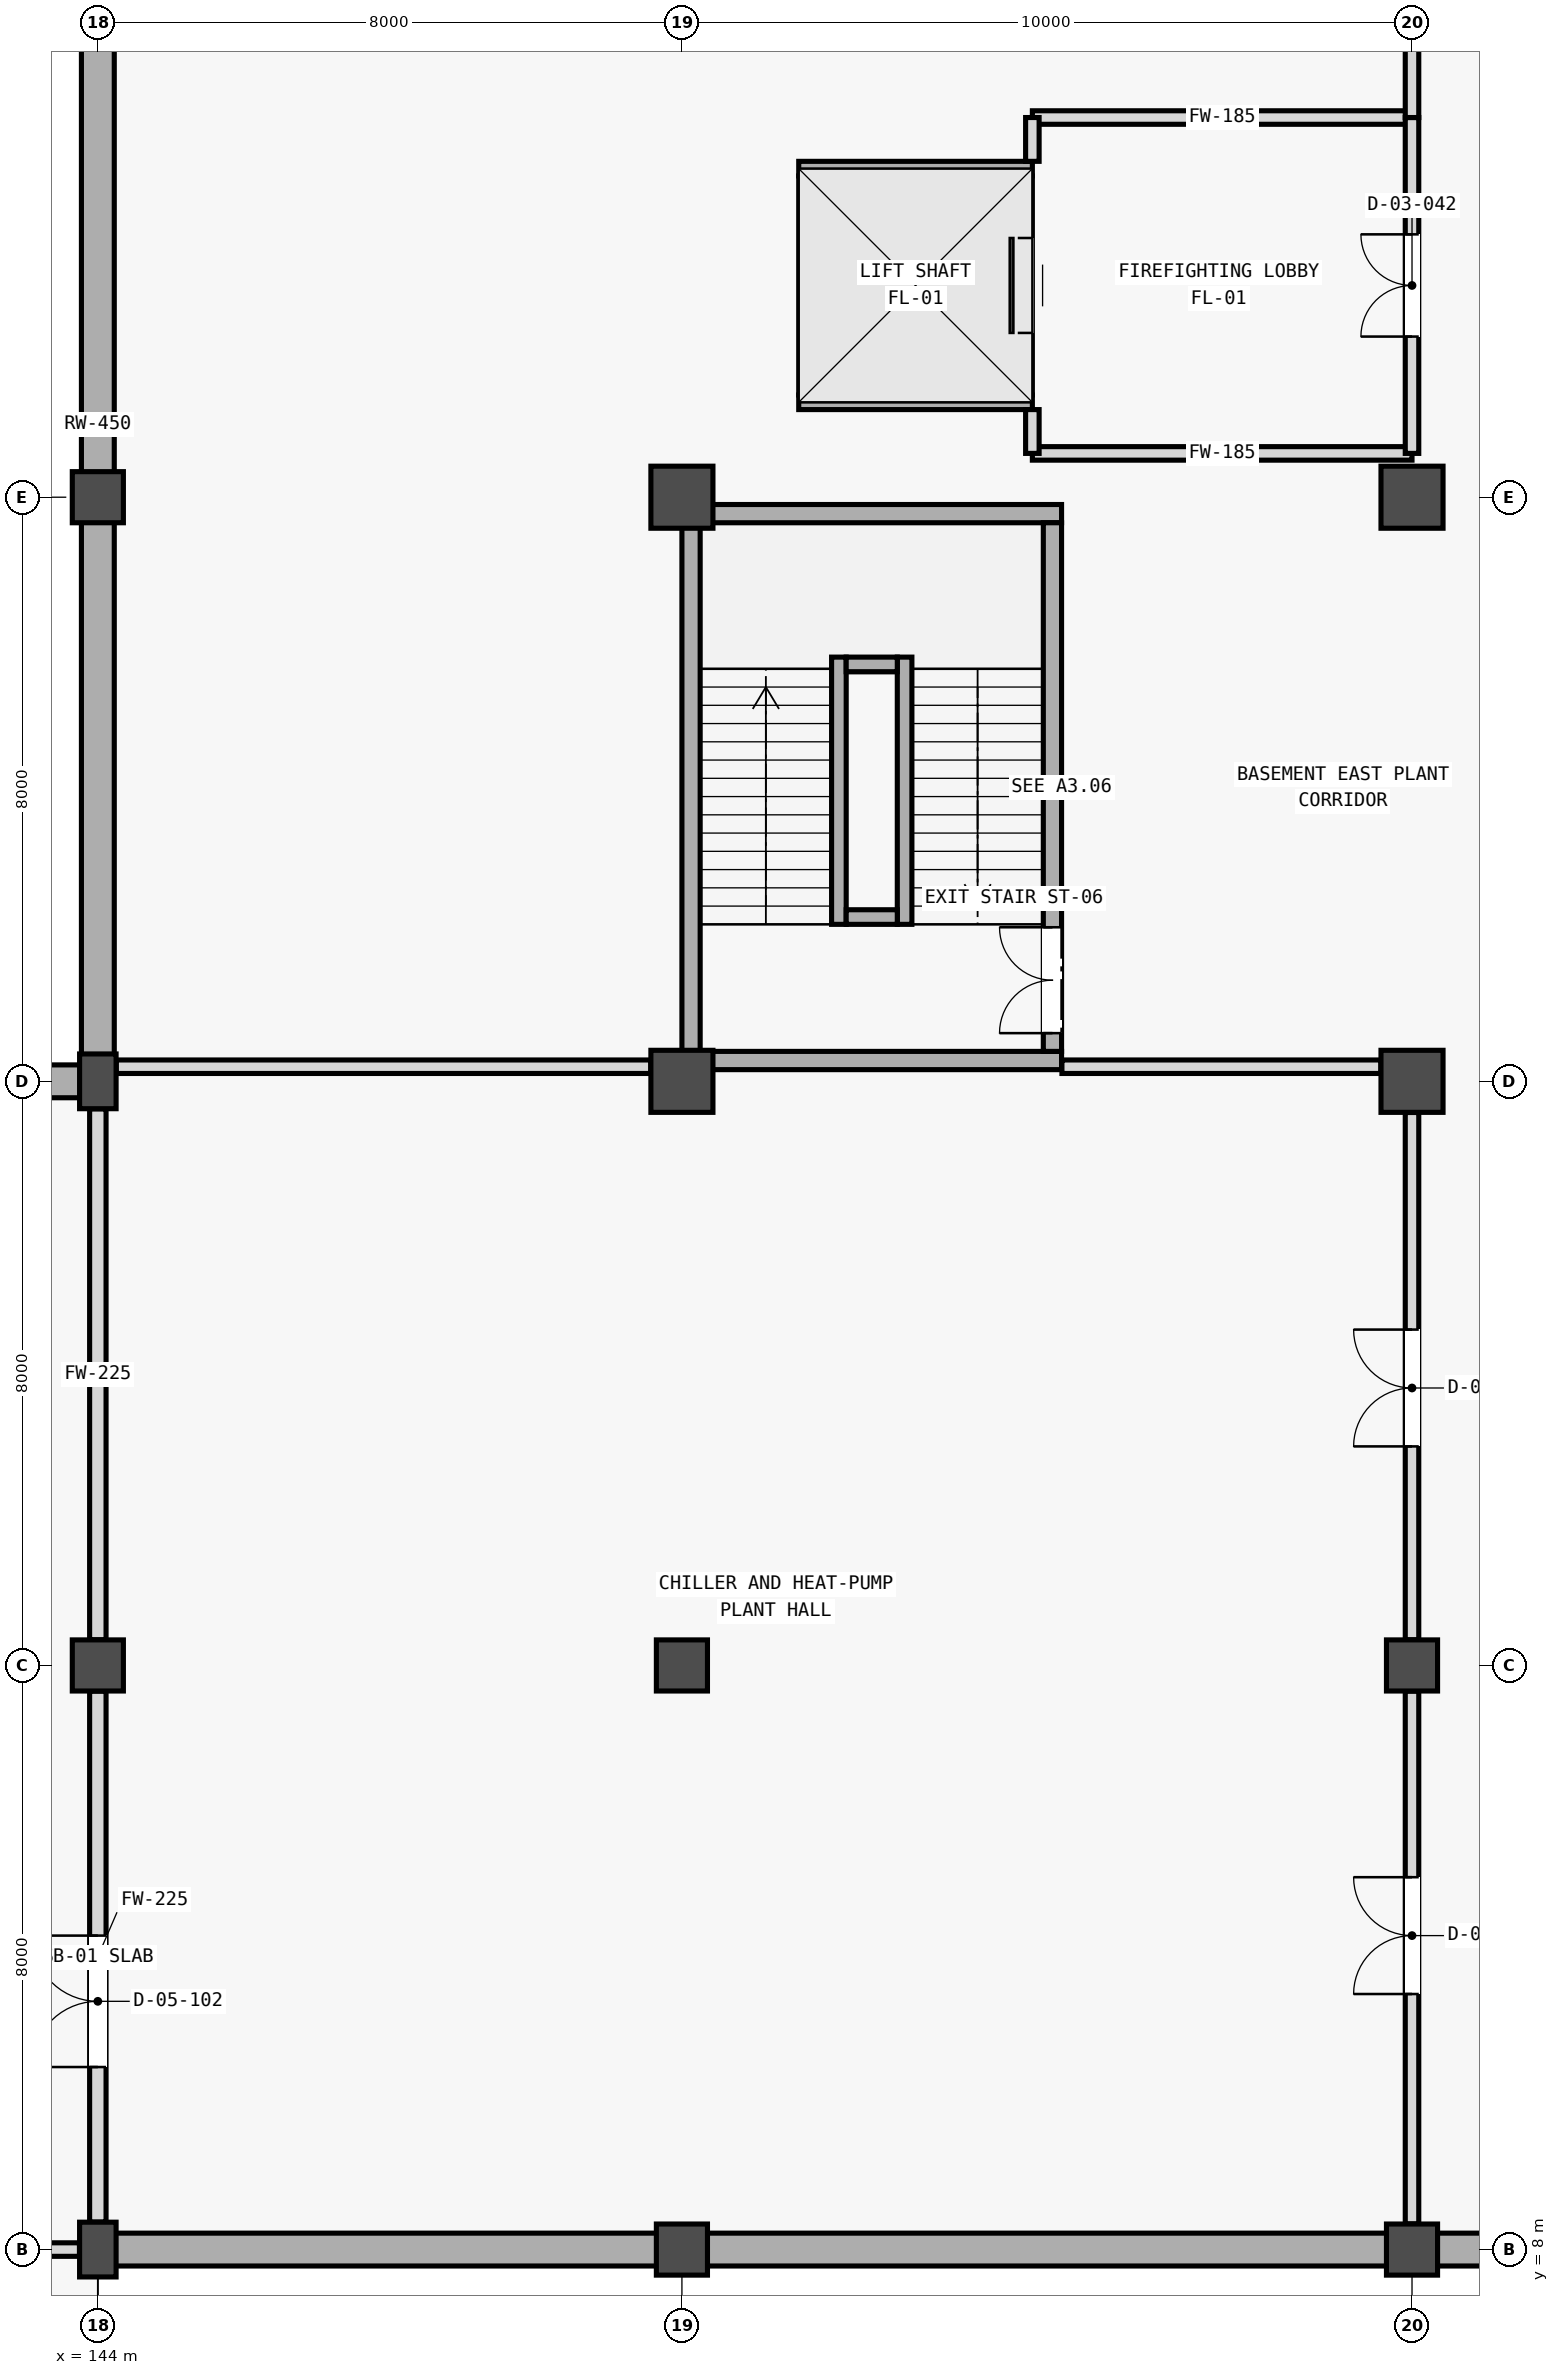
"""IFC4 building model, lengths in metres.
Left out: names, types, materials, properties, quantities, classifications, styles, units other than length and angle.
Written with IfcOpenShell. Run it as: python <this file> out.ifc"""

import sys

from ifc_helpers import new_model, si_unit, direction, frame, frame_2d, origin, origin_2d, place, context, subcontext, project, spatial, rectangle, extrude, element, fill, save


model = new_model("IFC4")
c1 = context("Model", 3, precision=1e-05, world=origin(), true_north=direction((0.0, 1.0)))
c2 = subcontext(c1, "Body", "Model", "MODEL_VIEW")
j1 = project(units=[si_unit("LENGTHUNIT", "METRE"), si_unit("PLANEANGLEUNIT", "RADIAN")], contexts=[c1])
p1 = place(None, origin())
s1 = spatial("IfcSite", under=j1, at=p1, CompositionType="ELEMENT")
p2 = place(p1, origin())
s2 = spatial("IfcBuilding", under=s1, at=p2, CompositionType="ELEMENT")
p3 = place(p2, frame((0.0, 0.0, -4.8)))
s3 = spatial("IfcBuildingStorey", under=s2, at=p3, CompositionType="ELEMENT", Elevation=-4.8)
for number, where, z_axis, x_axis in (
    (1, (144.0, 8.0, 0.0), (0.0, 0.0, 1.0), (1.0, 0.0, 0.0)),
    (2, (144.0, 24.0, 0.0), (0.0, 0.0, 1.0), (1.0, 0.0, 0.0)),
):
    element("IfcColumn", number, at=place(p3, frame(where, z_axis=z_axis, x_axis=x_axis)), inside=s3, PredefinedType="COLUMN", context=c2, shape_type="SweptSolid", body=[
        extrude(rectangle(XDim=0.5, YDim=0.75, at=origin_2d()), origin(), (0.0, 0.0, 1.0), 4.5),
    ])
for number, where, z_axis, x_axis in (
    (3, (144.0, 16.0, 0.0), (0.0, 0.0, 1.0), (1.0, 0.0, 0.0)),
    (4, (152.0, 8.0, 0.0), (0.0, 0.0, 1.0), (1.0, 0.0, 0.0)),
    (5, (162.0, 8.0, 0.0), (0.0, 0.0, 1.0), (1.0, 0.0, 0.0)),
    (6, (152.0, 16.0, 0.0), (0.0, 0.0, 1.0), (1.0, 0.0, 0.0)),
    (7, (162.0, 16.0, 0.0), (0.0, 0.0, 1.0), (1.0, 0.0, 0.0)),
):
    element("IfcColumn", number, at=place(p3, frame(where, z_axis=z_axis, x_axis=x_axis)), inside=s3, PredefinedType="COLUMN", context=c2, shape_type="SweptSolid", body=[
        extrude(rectangle(XDim=0.7, YDim=0.7, at=origin_2d()), origin(), (0.0, 0.0, 1.0), 4.5),
    ])
for number, where, z_axis, x_axis in (
    (8, (152.0, 24.0, 0.0), (0.0, 0.0, 1.0), (1.0, 0.0, 0.0)),
    (9, (162.0, 24.0, 0.0), (0.0, 0.0, 1.0), (1.0, 0.0, 0.0)),
):
    element("IfcColumn", number, at=place(p3, frame(where, z_axis=z_axis, x_axis=x_axis)), inside=s3, PredefinedType="COLUMN", context=c2, shape_type="SweptSolid", body=[
        extrude(rectangle(XDim=0.85, YDim=0.85, at=origin_2d()), origin(), (0.0, 0.0, 1.0), 4.5),
    ])
p4 = place(p3, frame((144.0, 32.0, 0.0), z_axis=(0.0, 0.0, 1.0), x_axis=(1.0, 0.0, 0.0)))
e10 = element("IfcColumn", 10, at=p4, inside=s3, PredefinedType="COLUMN", context=c2, shape_type="SweptSolid", body=[
    extrude(rectangle(XDim=0.7, YDim=0.7, at=origin_2d()), origin(), (0.0, 0.0, 1.0), 4.5),
])
for number, where, z_axis, x_axis in (
    (11, (152.0, 32.0, 0.0), (0.0, 0.0, 1.0), (1.0, 0.0, 0.0)),
    (12, (162.0, 32.0, 0.0), (0.0, 0.0, 1.0), (1.0, 0.0, 0.0)),
):
    element("IfcColumn", number, at=place(p3, frame(where, z_axis=z_axis, x_axis=x_axis)), inside=s3, PredefinedType="COLUMN", context=c2, shape_type="SweptSolid", body=[
        extrude(rectangle(XDim=0.85, YDim=0.85, at=origin_2d()), origin(), (0.0, 0.0, 1.0), 4.5),
    ])
p5 = place(p3, frame((96.0, 24.0, 0.0), z_axis=(0.0, 0.0, 1.0), x_axis=(1.0, 0.0, 0.0)))
e13 = element("IfcWall", 13, at=p5, inside=s3, PredefinedType="SOLIDWALL", context=c2, shape_type="SweptSolid", body=[
    extrude(rectangle(XDim=48.0, YDim=0.45, at=frame_2d((24.0, 0.0))), origin(), (0.0, 0.0, 1.0), 4.47),
])
p6 = place(p3, frame((144.0, 24.0, 0.0), z_axis=(0.0, 0.0, 1.0), x_axis=(0.0, 1.0, 0.0)))
e14 = element("IfcWall", 14, at=p6, inside=s3, PredefinedType="SOLIDWALL", context=c2, shape_type="SweptSolid", body=[
    extrude(rectangle(XDim=60.0, YDim=0.45, at=frame_2d((30.0, 0.0))), origin(), (0.0, 0.0, 1.0), 4.47),
])
p7 = place(p3, frame((144.0, 8.0, 0.0), z_axis=(0.0, 0.0, 1.0), x_axis=(1.0, 0.0, 0.0)))
e15 = element("IfcWall", 15, at=p7, inside=s3, PredefinedType="SOLIDWALL", context=c2, shape_type="SweptSolid", body=[
    extrude(rectangle(XDim=24.0, YDim=0.45, at=frame_2d((12.0, 0.0))), origin(), (0.0, 0.0, 1.0), 4.47),
])
for number, where, z_axis, x_axis in (
    (16, (152.0, 24.285, 0.0), (0.0, 0.0, 1.0), (1.0, 0.0, 0.0)),
    (17, (152.0, 31.775, 0.0), (0.0, 0.0, 1.0), (1.0, 0.0, 0.0)),
):
    element("IfcWall", number, at=place(p3, frame(where, z_axis=z_axis, x_axis=x_axis)), inside=s3, PredefinedType="SHEAR", context=c2, shape_type="SweptSolid", body=[
        extrude(rectangle(XDim=5.2, YDim=0.25, at=frame_2d((2.6, 0.0))), origin(), (0.0, 0.0, 1.0), 4.8),
    ])
p8 = place(p3, frame((152.125, 24.41, 0.0), z_axis=(0.0, 0.0, 1.0), x_axis=(0.0, 1.0, 0.0)))
e18 = element("IfcWall", 18, at=p8, inside=s3, PredefinedType="SHEAR", context=c2, shape_type="SweptSolid", body=[
    extrude(rectangle(XDim=7.24, YDim=0.25, at=frame_2d((3.62, 0.0))), origin(), (0.0, 0.0, 1.0), 4.8),
])
p9 = place(p3, frame((157.075, 24.41, 0.0), z_axis=(0.0, 0.0, 1.0), x_axis=(0.0, 1.0, 0.0)))
e19 = element("IfcWall", 19, at=p9, inside=s3, PredefinedType="SHEAR", context=c2, shape_type="SweptSolid", body=[
    extrude(rectangle(XDim=7.24, YDim=0.25, at=frame_2d((3.62, 0.0))), origin(), (0.0, 0.0, 1.0), 4.8),
])
p10 = place(p9, frame((0.25, 0.0, 0.0)))
e20 = element("IfcOpeningElement", 20, at=p10, cuts=e19, PredefinedType="OPENING", context=c2, shape_type="SweptSolid", body=[
    extrude(rectangle(XDim=1.45, YDim=2.2, at=frame_2d((0.725, 1.1))), frame((0.0, 0.135, 0.0), z_axis=(0.0, -1.0, 0.0), x_axis=(1.0, 0.0, 0.0)), (0.0, 0.0, 1.0), 0.27),
])
for number, where, z_axis, x_axis in (
    (21, (154.15, 26.15, 0.0), (0.0, 0.0, 1.0), (0.0, 1.0, 0.0)),
    (22, (155.05, 26.15, 0.0), (0.0, 0.0, 1.0), (0.0, 1.0, 0.0)),
):
    element("IfcWall", number, at=place(p3, frame(where, z_axis=z_axis, x_axis=x_axis)), inside=s3, PredefinedType="SHEAR", context=c2, shape_type="SweptSolid", body=[
        extrude(rectangle(XDim=3.66, YDim=0.2, at=frame_2d((1.83, 0.0))), origin(), (0.0, 0.0, 1.0), 4.8),
    ])
for number, where, z_axis, x_axis in (
    (23, (154.25, 26.25, 0.0), (0.0, 0.0, 1.0), (1.0, 0.0, 0.0)),
    (24, (154.25, 29.71, 0.0), (0.0, 0.0, 1.0), (1.0, 0.0, 0.0)),
):
    element("IfcWall", number, at=place(p3, frame(where, z_axis=z_axis, x_axis=x_axis)), inside=s3, PredefinedType="SHEAR", context=c2, shape_type="SweptSolid", body=[
        extrude(rectangle(XDim=0.7, YDim=0.2, at=frame_2d((0.35, 0.0))), origin(), (0.0, 0.0, 1.0), 4.8),
    ])
for number, where, z_axis, x_axis in (
    (25, (153.6, 33.3, 0.0), (0.0, 0.0, 1.0), (1.0, 0.0, 0.0)),
    (26, (153.6, 36.5, 0.0), (0.0, 0.0, 1.0), (1.0, 0.0, 0.0)),
):
    element("IfcWall", number, at=place(p3, frame(where, z_axis=z_axis, x_axis=x_axis)), inside=s3, PredefinedType="SHEAR", context=c2, shape_type="SweptSolid", body=[
        extrude(rectangle(XDim=3.2, YDim=0.2, at=frame_2d((1.6, 0.0))), origin(), (0.0, 0.0, 1.0), 4.8),
    ])
p11 = place(p3, frame((153.7, 33.4, 0.0), z_axis=(0.0, 0.0, 1.0), x_axis=(0.0, 1.0, 0.0)))
e27 = element("IfcWall", 27, at=p11, inside=s3, PredefinedType="SHEAR", context=c2, shape_type="SweptSolid", body=[
    extrude(rectangle(XDim=3.0, YDim=0.2, at=frame_2d((1.5, 0.0))), origin(), (0.0, 0.0, 1.0), 4.8),
])
p12 = place(p3, frame((156.7, 33.4, 0.0), z_axis=(0.0, 0.0, 1.0), x_axis=(0.0, 1.0, 0.0)))
e28 = element("IfcWall", 28, at=p12, inside=s3, PredefinedType="SHEAR", context=c2, shape_type="SweptSolid", body=[
    extrude(rectangle(XDim=3.0, YDim=0.2, at=frame_2d((1.5, 0.0))), origin(), (0.0, 0.0, 1.0), 4.8),
])
p13 = place(p12, frame((0.85, 0.0, 0.0)))
e29 = element("IfcOpeningElement", 29, at=p13, cuts=e28, PredefinedType="OPENING", context=c2, shape_type="SweptSolid", body=[
    extrude(rectangle(XDim=1.3, YDim=2.3, at=frame_2d((0.65, 1.15))), frame((0.0, 0.11, 0.0), z_axis=(0.0, -1.0, 0.0), x_axis=(1.0, 0.0, 0.0)), (0.0, 0.0, 1.0), 0.22),
])
for number, where, z_axis, x_axis in (
    (30, (162.0, 32.6, 0.0), (0.0, 0.0, 1.0), (-1.0, 0.0, 0.0)),
    (31, (156.8, 37.2, 0.0), (0.0, 0.0, 1.0), (1.0, 0.0, 0.0)),
):
    element("IfcWall", number, at=place(p3, frame(where, z_axis=z_axis, x_axis=x_axis)), inside=s3, PredefinedType="STANDARD", context=c2, shape_type="SweptSolid", body=[
        extrude(rectangle(XDim=5.2, YDim=0.185, at=frame_2d((2.6, 0.0))), origin(), (0.0, 0.0, 1.0), 3.75),
    ])
p14 = place(p3, frame((162.0, 32.6, 0.0), z_axis=(0.0, 0.0, 1.0), x_axis=(0.0, 1.0, 0.0)))
e32 = element("IfcWall", 32, at=p14, inside=s3, PredefinedType="STANDARD", context=c2, shape_type="SweptSolid", body=[
    extrude(rectangle(XDim=4.6, YDim=0.185, at=frame_2d((2.3, 0.0))), origin(), (0.0, 0.0, 1.0), 3.75),
])
p15 = place(p14, frame((1.6, 0.0, 0.0)))
e33 = element("IfcOpeningElement", 33, at=p15, cuts=e32, PredefinedType="OPENING", context=c2, shape_type="SweptSolid", body=[
    extrude(rectangle(XDim=1.4, YDim=2.2, at=frame_2d((0.7, 1.1))), frame((0.0, 0.103, 0.0), z_axis=(0.0, -1.0, 0.0), x_axis=(1.0, 0.0, 0.0)), (0.0, 0.0, 1.0), 0.205),
])
for number, where, z_axis, x_axis in (
    (34, (156.8, 32.6, 0.0), (0.0, 0.0, 1.0), (0.0, 1.0, 0.0)),
    (35, (156.8, 36.6, 0.0), (0.0, 0.0, 1.0), (0.0, 1.0, 0.0)),
):
    element("IfcWall", number, at=place(p3, frame(where, z_axis=z_axis, x_axis=x_axis)), inside=s3, PredefinedType="STANDARD", context=c2, shape_type="SweptSolid", body=[
        extrude(rectangle(XDim=0.6, YDim=0.185, at=frame_2d((0.3, 0.0))), origin(), (0.0, 0.0, 1.0), 3.75),
    ])
p16 = place(p3, frame((144.0, 8.377, 0.0), z_axis=(0.0, 0.0, 1.0), x_axis=(0.0, 1.0, 0.0)))
e36 = element("IfcWall", 36, at=p16, inside=s3, PredefinedType="STANDARD", context=c2, shape_type="SweptSolid", body=[
    extrude(rectangle(XDim=7.271, YDim=0.225, at=frame_2d((3.635, 0.0))), origin(), (0.0, 0.0, 1.0), 3.9),
])
p17 = place(p16, frame((2.123, 0.0, 0.0)))
e37 = element("IfcOpeningElement", 37, at=p17, cuts=e36, PredefinedType="OPENING", context=c2, shape_type="SweptSolid", body=[
    extrude(rectangle(XDim=1.8, YDim=2.3, at=frame_2d((0.9, 1.15))), frame((0.0, 0.123, 0.0), z_axis=(0.0, -1.0, 0.0), x_axis=(1.0, 0.0, 0.0)), (0.0, 0.0, 1.0), 0.245),
])
p18 = place(p3, frame((144.0, 16.352, 0.0), z_axis=(0.0, 0.0, 1.0), x_axis=(0.0, 1.0, 0.0)))
e38 = element("IfcWall", 38, at=p18, inside=s3, PredefinedType="STANDARD", context=c2, shape_type="SweptSolid", body=[
    extrude(rectangle(XDim=7.271, YDim=0.225, at=frame_2d((3.635, 0.0))), origin(), (0.0, 0.0, 1.0), 3.9),
])
p19 = place(p3, frame((136.252, 8.0, 0.0), z_axis=(0.0, 0.0, 1.0), x_axis=(1.0, 0.0, 0.0)))
e39 = element("IfcWall", 39, at=p19, inside=s3, PredefinedType="STANDARD", context=c2, shape_type="SweptSolid", body=[
    extrude(rectangle(XDim=7.496, YDim=0.185, at=frame_2d((3.748, 0.0))), origin(), (0.0, 0.0, 1.0), 3.65),
])
p20 = place(p19, frame((1.748, 0.0, 0.0)))
e40 = element("IfcOpeningElement", 40, at=p20, cuts=e39, PredefinedType="OPENING", context=c2, shape_type="SweptSolid", body=[
    extrude(rectangle(XDim=1.75, YDim=2.35, at=frame_2d((0.875, 1.175))), frame((0.0, 0.103, 0.0), z_axis=(0.0, -1.0, 0.0), x_axis=(1.0, 0.0, 0.0)), (0.0, 0.0, 1.0), 0.205),
])
p21 = place(p3, frame((162.0, 8.352, 0.0), z_axis=(0.0, 0.0, 1.0), x_axis=(0.0, 1.0, 0.0)))
e41 = element("IfcWall", 41, at=p21, inside=s3, PredefinedType="STANDARD", context=c2, shape_type="SweptSolid", body=[
    extrude(rectangle(XDim=7.296, YDim=0.185, at=frame_2d((3.648, 0.0))), origin(), (0.0, 0.0, 1.0), 3.75),
])
p22 = place(p21, frame((3.148, 0.0, 0.0)))
e42 = element("IfcOpeningElement", 42, at=p22, cuts=e41, PredefinedType="OPENING", context=c2, shape_type="SweptSolid", body=[
    extrude(rectangle(XDim=1.6, YDim=2.3, at=frame_2d((0.8, 1.15))), frame((0.0, 0.103, 0.0), z_axis=(0.0, -1.0, 0.0), x_axis=(1.0, 0.0, 0.0)), (0.0, 0.0, 1.0), 0.205),
])
p23 = place(p3, frame((162.0, 16.352, 0.0), z_axis=(0.0, 0.0, 1.0), x_axis=(0.0, 1.0, 0.0)))
e43 = element("IfcWall", 43, at=p23, inside=s3, PredefinedType="STANDARD", context=c2, shape_type="SweptSolid", body=[
    extrude(rectangle(XDim=7.221, YDim=0.185, at=frame_2d((3.61, 0.0))), origin(), (0.0, 0.0, 1.0), 3.75),
])
p24 = place(p23, frame((2.648, 0.0, 0.0)))
e44 = element("IfcOpeningElement", 44, at=p24, cuts=e43, PredefinedType="OPENING", context=c2, shape_type="SweptSolid", body=[
    extrude(rectangle(XDim=1.6, YDim=2.3, at=frame_2d((0.8, 1.15))), frame((0.0, 0.103, 0.0), z_axis=(0.0, -1.0, 0.0), x_axis=(1.0, 0.0, 0.0)), (0.0, 0.0, 1.0), 0.205),
])
p25 = place(p3, frame((162.0, 37.2, 0.0), z_axis=(0.0, 0.0, 1.0), x_axis=(0.0, 1.0, 0.0)))
e45 = element("IfcWall", 45, at=p25, inside=s3, PredefinedType="STANDARD", context=c2, shape_type="SweptSolid", body=[
    extrude(rectangle(XDim=2.373, YDim=0.185, at=frame_2d((1.187, 0.0))), origin(), (0.0, 0.0, 1.0), 3.75),
])
p26 = place(p3, frame((144.252, 24.2, 0.0), z_axis=(0.0, 0.0, 1.0), x_axis=(1.0, 0.0, 0.0)))
e46 = element("IfcWall", 46, at=p26, inside=s3, PredefinedType="STANDARD", context=c2, shape_type="SweptSolid", body=[
    extrude(rectangle(XDim=7.321, YDim=0.185, at=frame_2d((3.661, 0.0))), origin(), (0.0, 0.0, 1.0), 3.7),
])
p27 = place(p3, frame((157.205, 24.2, 0.0), z_axis=(0.0, 0.0, 1.0), x_axis=(1.0, 0.0, 0.0)))
e47 = element("IfcWall", 47, at=p27, inside=s3, PredefinedType="STANDARD", context=c2, shape_type="SweptSolid", body=[
    extrude(rectangle(XDim=4.368, YDim=0.185, at=frame_2d((2.184, 0.0))), origin(), (0.0, 0.0, 1.0), 3.35),
])
p28 = place(p10, origin())
e48 = element("IfcDoor", 48, at=p28, inside=s3, OperationType="DOUBLE_DOOR_SINGLE_SWING", PredefinedType="DOOR", context=c2, shape_type="SweptSolid", body=[
    extrude(rectangle(XDim=1.45, YDim=2.2, at=frame_2d((0.725, 1.1))), frame((0.0, 0.025, 0.0), z_axis=(0.0, -1.0, 0.0), x_axis=(1.0, 0.0, 0.0)), (0.0, 0.0, 1.0), 0.05),
])
fill(e20, e48)
p29 = place(p13, origin())
e49 = element("IfcDoor", 49, at=p29, inside=s3, OperationType="SLIDING_TO_RIGHT", PredefinedType="DOOR", context=c2, shape_type="SweptSolid", body=[
    extrude(rectangle(XDim=1.3, YDim=2.3, at=frame_2d((0.65, 1.15))), frame((0.0, 0.025, 0.0), z_axis=(0.0, -1.0, 0.0), x_axis=(1.0, 0.0, 0.0)), (0.0, 0.0, 1.0), 0.05),
])
fill(e29, e49)
p30 = place(p15, origin())
e50 = element("IfcDoor", 50, at=p30, inside=s3, OperationType="DOUBLE_DOOR_SINGLE_SWING", PredefinedType="DOOR", context=c2, shape_type="SweptSolid", body=[
    extrude(rectangle(XDim=1.4, YDim=2.2, at=frame_2d((0.7, 1.1))), frame((0.0, 0.025, 0.0), z_axis=(0.0, -1.0, 0.0), x_axis=(1.0, 0.0, 0.0)), (0.0, 0.0, 1.0), 0.05),
])
fill(e33, e50)
p31 = place(p17, origin())
e51 = element("IfcDoor", 51, at=p31, inside=s3, OperationType="DOUBLE_DOOR_SINGLE_SWING", PredefinedType="DOOR", context=c2, shape_type="SweptSolid", body=[
    extrude(rectangle(XDim=1.8, YDim=2.3, at=frame_2d((0.9, 1.15))), frame((0.0, 0.025, 0.0), z_axis=(0.0, -1.0, 0.0), x_axis=(1.0, 0.0, 0.0)), (0.0, 0.0, 1.0), 0.05),
])
fill(e37, e51)
p32 = place(p22, origin())
e52 = element("IfcDoor", 52, at=p32, inside=s3, OperationType="DOUBLE_DOOR_SINGLE_SWING", PredefinedType="DOOR", context=c2, shape_type="SweptSolid", body=[
    extrude(rectangle(XDim=1.6, YDim=2.3, at=frame_2d((0.8, 1.15))), frame((0.0, 0.025, 0.0), z_axis=(0.0, -1.0, 0.0), x_axis=(1.0, 0.0, 0.0)), (0.0, 0.0, 1.0), 0.05),
])
fill(e42, e52)
p33 = place(p24, origin())
e53 = element("IfcDoor", 53, at=p33, inside=s3, OperationType="DOUBLE_DOOR_SINGLE_SWING", PredefinedType="DOOR", context=c2, shape_type="SweptSolid", body=[
    extrude(rectangle(XDim=1.6, YDim=2.3, at=frame_2d((0.8, 1.15))), frame((0.0, 0.025, 0.0), z_axis=(0.0, -1.0, 0.0), x_axis=(1.0, 0.0, 0.0)), (0.0, 0.0, 1.0), 0.05),
])
fill(e44, e53)
save(model, sys.argv[1])
